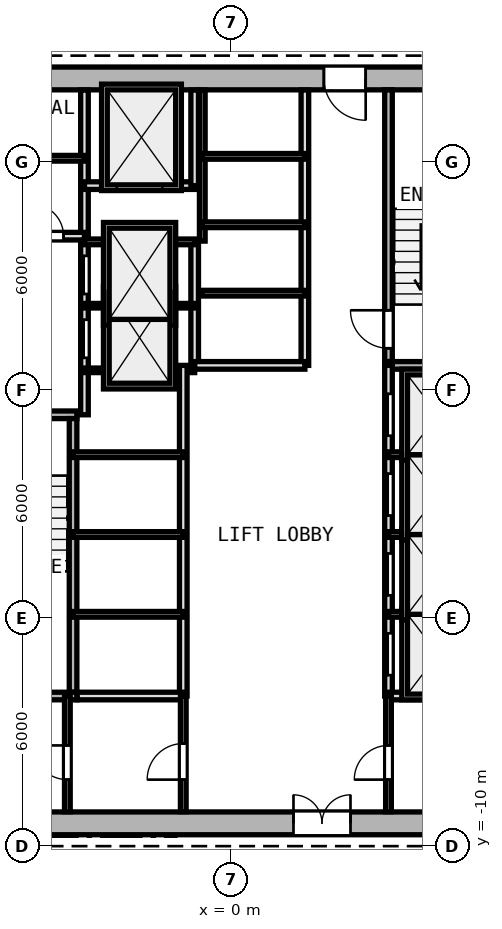
"""IFC4 building model, lengths in metres.
Left out: names, types, materials, properties, quantities, classifications, styles, units other than length and angle.
Written with IfcOpenShell. Run it as: python <this file> out.ifc"""

import sys

from ifc_helpers import new_model, si_unit, direction, frame, frame_2d, origin, origin_2d, place, context, subcontext, project, spatial, rectangle, i_section, extrude, element, fill, save


model = new_model("IFC4")
c1 = context("Model", 3, precision=1e-05, world=origin(), true_north=direction((0.0, 1.0)))
c2 = subcontext(c1, "Body", "Model", "MODEL_VIEW")
j1 = project(units=[si_unit("LENGTHUNIT", "METRE"), si_unit("PLANEANGLEUNIT", "RADIAN")], contexts=[c1])
p1 = place(None, origin())
s1 = spatial("IfcSite", under=j1, at=p1, CompositionType="ELEMENT")
p2 = place(p1, origin())
s2 = spatial("IfcBuilding", under=s1, at=p2, CompositionType="ELEMENT")
p3 = place(p2, frame((0.0, 0.0, 26.4)))
s3 = spatial("IfcBuildingStorey", under=s2, at=p3, CompositionType="ELEMENT", Elevation=26.4)
p4 = place(p3, frame((0.0, -9.4, 0.0), z_axis=(0.0, 0.0, 1.0), x_axis=(1.0, 0.0, 0.0)))
e1 = element("IfcColumn", 1, at=p4, inside=s3, PredefinedType="COLUMN", context=c2, shape_type="SweptSolid", body=[
    extrude(i_section(OverallWidth=0.416, OverallDepth=0.446, WebThickness=0.025, FlangeThickness=0.04, FilletRadius=0.015, at=origin_2d()), origin(), (0.0, 0.0, 1.0), 3.6),
])
p5 = place(p3, frame((-8.0, -9.4, 0.0), z_axis=(0.0, 0.0, 1.0), x_axis=(1.0, 0.0, 0.0)))
e2 = element("IfcWall", 2, at=p5, inside=s3, PredefinedType="SHEAR", context=c2, shape_type="SweptSolid", body=[
    extrude(rectangle(XDim=16.0, YDim=0.6, at=frame_2d((8.0, 0.0))), origin(), (0.0, 0.0, 1.0), 3.35),
])
p6 = place(p5, frame((9.65, 0.0, 0.0)))
e3 = element("IfcOpeningElement", 3, at=p6, cuts=e2, PredefinedType="OPENING", context=c2, shape_type="SweptSolid", body=[
    extrude(rectangle(XDim=1.5, YDim=2.2, at=frame_2d((0.75, 1.1))), frame((0.0, 0.31, 0.0), z_axis=(0.0, -1.0, 0.0), x_axis=(1.0, 0.0, 0.0)), (0.0, 0.0, 1.0), 0.62),
])
p7 = place(p3, frame((8.0, 10.2, 0.0), z_axis=(0.0, 0.0, 1.0), x_axis=(-1.0, 0.0, 0.0)))
e4 = element("IfcWall", 4, at=p7, inside=s3, PredefinedType="SHEAR", context=c2, shape_type="SweptSolid", body=[
    extrude(rectangle(XDim=16.0, YDim=0.6, at=frame_2d((8.0, 0.0))), origin(), (0.0, 0.0, 1.0), 3.35),
])
p8 = place(p7, frame((4.45, 0.0, 0.0)))
e5 = element("IfcOpeningElement", 5, at=p8, cuts=e4, PredefinedType="OPENING", context=c2, shape_type="SweptSolid", body=[
    extrude(rectangle(XDim=1.1, YDim=2.15, at=frame_2d((0.55, 1.075))), frame((0.0, 0.31, 0.0), z_axis=(0.0, -1.0, 0.0), x_axis=(1.0, 0.0, 0.0)), (0.0, 0.0, 1.0), 0.62),
])
p9 = place(p3, frame((-7.4, 1.35, 0.0), z_axis=(0.0, 0.0, 1.0), x_axis=(1.0, 0.0, 0.0)))
e6 = element("IfcWall", 6, at=p9, inside=s3, PredefinedType="SOLIDWALL", context=c2, shape_type="SweptSolid", body=[
    extrude(rectangle(XDim=3.35, YDim=0.2, at=frame_2d((1.675, 0.0))), origin(), (0.0, 0.0, 1.0), 3.35),
])
p10 = place(p9, frame((0.65, 0.0, 0.0)))
e7 = element("IfcOpeningElement", 7, at=p10, cuts=e6, PredefinedType="OPENING", context=c2, shape_type="SweptSolid", body=[
    extrude(rectangle(XDim=1.0, YDim=2.15, at=frame_2d((0.5, 1.075))), frame((0.0, 0.11, 0.0), z_axis=(0.0, -1.0, 0.0), x_axis=(1.0, 0.0, 0.0)), (0.0, 0.0, 1.0), 0.22),
])
p11 = place(p3, frame((-4.15, -5.95, 0.0), z_axis=(0.0, 0.0, 1.0), x_axis=(0.0, 1.0, 0.0)))
e8 = element("IfcWall", 8, at=p11, inside=s3, PredefinedType="SOLIDWALL", context=c2, shape_type="SweptSolid", body=[
    extrude(rectangle(XDim=7.2, YDim=0.2, at=frame_2d((3.6, 0.0))), origin(), (0.0, 0.0, 1.0), 3.35),
])
p12 = place(p3, frame((-3.85, 1.35, 0.0), z_axis=(0.0, 0.0, 1.0), x_axis=(0.0, 1.0, 0.0)))
e9 = element("IfcWall", 9, at=p12, inside=s3, PredefinedType="SOLIDWALL", context=c2, shape_type="SweptSolid", body=[
    extrude(rectangle(XDim=8.545, YDim=0.2, at=frame_2d((4.272, 0.0))), origin(), (0.0, 0.0, 1.0), 3.35),
])
p13 = place(p12, frame((1.5, 0.0, 0.0)))
e10 = element("IfcOpeningElement", 10, at=p13, cuts=e9, PredefinedType="OPENING", context=c2, shape_type="SweptSolid", body=[
    extrude(rectangle(XDim=1.0, YDim=2.15, at=frame_2d((0.5, 1.075))), frame((0.0, 0.11, 0.0), z_axis=(0.0, -1.0, 0.0), x_axis=(1.0, 0.0, 0.0)), (0.0, 0.0, 1.0), 0.22),
])
p14 = place(p12, frame((3.18, 0.0, 0.0)))
e11 = element("IfcOpeningElement", 11, at=p14, cuts=e9, PredefinedType="OPENING", context=c2, shape_type="SweptSolid", body=[
    extrude(rectangle(XDim=1.0, YDim=2.15, at=frame_2d((0.5, 1.075))), frame((0.0, 0.11, 0.0), z_axis=(0.0, -1.0, 0.0), x_axis=(1.0, 0.0, 0.0)), (0.0, 0.0, 1.0), 0.22),
])
p15 = place(p3, frame((-7.395, 6.05, 0.0), z_axis=(0.0, 0.0, 1.0), x_axis=(1.0, 0.0, 0.0)))
e12 = element("IfcWall", 12, at=p15, inside=s3, PredefinedType="SOLIDWALL", context=c2, shape_type="SweptSolid", body=[
    extrude(rectangle(XDim=3.545, YDim=0.2, at=frame_2d((1.772, 0.0))), origin(), (0.0, 0.0, 1.0), 3.35),
])
p16 = place(p15, frame((0.345, 0.0, 0.0)))
e13 = element("IfcOpeningElement", 13, at=p16, cuts=e12, PredefinedType="OPENING", context=c2, shape_type="SweptSolid", body=[
    extrude(rectangle(XDim=0.85, YDim=2.1, at=frame_2d((0.425, 1.05))), frame((0.0, 0.11, 0.0), z_axis=(0.0, -1.0, 0.0), x_axis=(1.0, 0.0, 0.0)), (0.0, 0.0, 1.0), 0.22),
])
p17 = place(p15, frame((2.145, 0.0, 0.0)))
e14 = element("IfcOpeningElement", 14, at=p17, cuts=e12, PredefinedType="OPENING", context=c2, shape_type="SweptSolid", body=[
    extrude(rectangle(XDim=0.85, YDim=2.1, at=frame_2d((0.425, 1.05))), frame((0.0, 0.11, 0.0), z_axis=(0.0, -1.0, 0.0), x_axis=(1.0, 0.0, 0.0)), (0.0, 0.0, 1.0), 0.22),
])
p18 = place(p3, frame((-7.395, 8.1, 0.0), z_axis=(0.0, 0.0, 1.0), x_axis=(1.0, 0.0, 0.0)))
e15 = element("IfcWall", 15, at=p18, inside=s3, PredefinedType="PARTITIONING", context=c2, shape_type="SweptSolid", body=[
    extrude(rectangle(XDim=3.545, YDim=0.15, at=frame_2d((1.772, 0.0))), origin(), (0.0, 0.0, 1.0), 3.35),
])
p19 = place(p3, frame((4.15, 2.75, 0.0), z_axis=(0.0, 0.0, 1.0), x_axis=(0.0, 1.0, 0.0)))
e16 = element("IfcWall", 16, at=p19, inside=s3, PredefinedType="SOLIDWALL", context=c2, shape_type="SweptSolid", body=[
    extrude(rectangle(XDim=7.15, YDim=0.2, at=frame_2d((3.575, 0.0))), origin(), (0.0, 0.0, 1.0), 3.35),
])
p20 = place(p19, frame((0.35, 0.0, 0.0)))
e17 = element("IfcOpeningElement", 17, at=p20, cuts=e16, PredefinedType="OPENING", context=c2, shape_type="SweptSolid", body=[
    extrude(rectangle(XDim=1.0, YDim=2.15, at=frame_2d((0.5, 1.075))), frame((0.0, 0.11, 0.0), z_axis=(0.0, -1.0, 0.0), x_axis=(1.0, 0.0, 0.0)), (0.0, 0.0, 1.0), 0.22),
])
p21 = place(p3, frame((4.05, 2.65, 0.0), z_axis=(0.0, 0.0, 1.0), x_axis=(1.0, 0.0, 0.0)))
e18 = element("IfcWall", 18, at=p21, inside=s3, PredefinedType="SOLIDWALL", context=c2, shape_type="SweptSolid", body=[
    extrude(rectangle(XDim=3.35, YDim=0.2, at=frame_2d((1.675, 0.0))), origin(), (0.0, 0.0, 1.0), 3.35),
])
p22 = place(p3, frame((-0.95, 2.65, 0.0), z_axis=(0.0, 0.0, 1.0), x_axis=(0.0, 1.0, 0.0)))
e19 = element("IfcWall", 19, at=p22, inside=s3, PredefinedType="SOLIDWALL", context=c2, shape_type="SweptSolid", body=[
    extrude(rectangle(XDim=3.27, YDim=0.2, at=frame_2d((1.635, 0.0))), origin(), (0.0, 0.0, 1.0), 3.35),
])
for number, where, z_axis, x_axis in (
    (20, (-3.85, 2.52, 0.0), (0.0, 0.0, 1.0), (1.0, 0.0, 0.0)),
    (21, (-3.85, 4.22, 0.0), (0.0, 0.0, 1.0), (1.0, 0.0, 0.0)),
):
    element("IfcWall", number, at=place(p3, frame(where, z_axis=z_axis, x_axis=x_axis)), inside=s3, PredefinedType="PARTITIONING", context=c2, shape_type="SweptSolid", body=[
        extrude(rectangle(XDim=2.9, YDim=0.12, at=frame_2d((1.45, 0.0))), origin(), (0.0, 0.0, 1.0), 3.35),
    ])
p23 = place(p3, frame((-3.85, 5.9, 0.0), z_axis=(0.0, 0.0, 1.0), x_axis=(1.0, 0.0, 0.0)))
e22 = element("IfcWall", 22, at=p23, inside=s3, PredefinedType="PARTITIONING", context=c2, shape_type="SweptSolid", body=[
    extrude(rectangle(XDim=2.9, YDim=0.15, at=frame_2d((1.45, 0.0))), origin(), (0.0, 0.0, 1.0), 3.35),
])
p24 = place(p3, frame((-3.85, 7.38, 0.0), z_axis=(0.0, 0.0, 1.0), x_axis=(1.0, 0.0, 0.0)))
e23 = element("IfcWall", 23, at=p24, inside=s3, PredefinedType="SOLIDWALL", context=c2, shape_type="SweptSolid", body=[
    extrude(rectangle(XDim=2.9, YDim=0.2, at=frame_2d((1.45, 0.0))), origin(), (0.0, 0.0, 1.0), 3.35),
])
p25 = place(p24, frame((0.85, 0.0, 0.0)))
e24 = element("IfcOpeningElement", 24, at=p25, cuts=e23, PredefinedType="OPENING", context=c2, shape_type="SweptSolid", body=[
    extrude(rectangle(XDim=1.2, YDim=2.2, at=frame_2d((0.6, 1.1))), frame((0.0, 0.11, 0.0), z_axis=(0.0, -1.0, 0.0), x_axis=(1.0, 0.0, 0.0)), (0.0, 0.0, 1.0), 0.22),
])
p26 = place(p3, frame((-0.95, 7.38, 0.0), z_axis=(0.0, 0.0, 1.0), x_axis=(0.0, 1.0, 0.0)))
e25 = element("IfcWall", 25, at=p26, inside=s3, PredefinedType="SOLIDWALL", context=c2, shape_type="SweptSolid", body=[
    extrude(rectangle(XDim=2.515, YDim=0.2, at=frame_2d((1.258, 0.0))), origin(), (0.0, 0.0, 1.0), 3.35),
])
p27 = place(p3, frame((4.15, -6.05, 0.0), z_axis=(0.0, 0.0, 1.0), x_axis=(0.0, 1.0, 0.0)))
e26 = element("IfcWall", 26, at=p27, inside=s3, PredefinedType="SOLIDWALL", context=c2, shape_type="SweptSolid", body=[
    extrude(rectangle(XDim=8.7, YDim=0.2, at=frame_2d((4.35, 0.0))), origin(), (0.0, 0.0, 1.0), 3.35),
])
p28 = place(p27, frame((0.55, 0.0, 0.0)))
e27 = element("IfcOpeningElement", 27, at=p28, cuts=e26, PredefinedType="OPENING", context=c2, shape_type="SweptSolid", body=[
    extrude(rectangle(XDim=1.1, YDim=2.15, at=frame_2d((0.55, 1.075))), frame((0.0, 0.11, 0.0), z_axis=(0.0, -1.0, 0.0), x_axis=(1.0, 0.0, 0.0)), (0.0, 0.0, 1.0), 0.22),
])
p29 = place(p27, frame((2.65, 0.0, 0.0)))
e28 = element("IfcOpeningElement", 28, at=p29, cuts=e26, PredefinedType="OPENING", context=c2, shape_type="SweptSolid", body=[
    extrude(rectangle(XDim=1.1, YDim=2.15, at=frame_2d((0.55, 1.075))), frame((0.0, 0.11, 0.0), z_axis=(0.0, -1.0, 0.0), x_axis=(1.0, 0.0, 0.0)), (0.0, 0.0, 1.0), 0.22),
])
p30 = place(p27, frame((4.75, 0.0, 0.0)))
e29 = element("IfcOpeningElement", 29, at=p30, cuts=e26, PredefinedType="OPENING", context=c2, shape_type="SweptSolid", body=[
    extrude(rectangle(XDim=1.1, YDim=2.15, at=frame_2d((0.55, 1.075))), frame((0.0, 0.11, 0.0), z_axis=(0.0, -1.0, 0.0), x_axis=(1.0, 0.0, 0.0)), (0.0, 0.0, 1.0), 0.22),
])
p31 = place(p27, frame((6.85, 0.0, 0.0)))
e30 = element("IfcOpeningElement", 30, at=p31, cuts=e26, PredefinedType="OPENING", context=c2, shape_type="SweptSolid", body=[
    extrude(rectangle(XDim=1.1, YDim=2.15, at=frame_2d((0.55, 1.075))), frame((0.0, 0.11, 0.0), z_axis=(0.0, -1.0, 0.0), x_axis=(1.0, 0.0, 0.0)), (0.0, 0.0, 1.0), 0.22),
])
for number, where, z_axis, x_axis in (
    (31, (4.15, -3.9, 0.0), (0.0, 0.0, 1.0), (1.0, 0.0, 0.0)),
    (32, (4.15, -1.8, 0.0), (0.0, 0.0, 1.0), (1.0, 0.0, 0.0)),
    (33, (4.15, 0.3, 0.0), (0.0, 0.0, 1.0), (1.0, 0.0, 0.0)),
):
    element("IfcWall", number, at=place(p3, frame(where, z_axis=z_axis, x_axis=x_axis)), inside=s3, PredefinedType="PARTITIONING", context=c2, shape_type="SweptSolid", body=[
        extrude(rectangle(XDim=2.6, YDim=0.15, at=frame_2d((1.3, 0.0))), origin(), (0.0, 0.0, 1.0), 3.35),
    ])
p32 = place(p3, frame((-1.25, -6.05, 0.0), z_axis=(0.0, 0.0, 1.0), x_axis=(0.0, 1.0, 0.0)))
e34 = element("IfcWall", 34, at=p32, inside=s3, PredefinedType="SOLIDWALL", context=c2, shape_type="SweptSolid", body=[
    extrude(rectangle(XDim=8.7, YDim=0.2, at=frame_2d((4.35, 0.0))), origin(), (0.0, 0.0, 1.0), 3.35),
])
for number, where, z_axis, x_axis in (
    (35, (-4.15, -3.9, 0.0), (0.0, 0.0, 1.0), (1.0, 0.0, 0.0)),
    (36, (-4.15, -1.8, 0.0), (0.0, 0.0, 1.0), (1.0, 0.0, 0.0)),
    (37, (-4.15, 0.3, 0.0), (0.0, 0.0, 1.0), (1.0, 0.0, 0.0)),
):
    element("IfcWall", number, at=place(p3, frame(where, z_axis=z_axis, x_axis=x_axis)), inside=s3, PredefinedType="PARTITIONING", context=c2, shape_type="SweptSolid", body=[
        extrude(rectangle(XDim=2.9, YDim=0.15, at=frame_2d((1.45, 0.0))), origin(), (0.0, 0.0, 1.0), 3.35),
    ])
p33 = place(p3, frame((1.95, 2.65, 0.0), z_axis=(0.0, 0.0, 1.0), x_axis=(0.0, 1.0, 0.0)))
e38 = element("IfcWall", 38, at=p33, inside=s3, PredefinedType="SOLIDWALL", context=c2, shape_type="SweptSolid", body=[
    extrude(rectangle(XDim=7.245, YDim=0.2, at=frame_2d((3.623, 0.0))), origin(), (0.0, 0.0, 1.0), 3.35),
])
p34 = place(p3, frame((-0.95, 2.65, 0.0), z_axis=(0.0, 0.0, 1.0), x_axis=(1.0, 0.0, 0.0)))
e39 = element("IfcWall", 39, at=p34, inside=s3, PredefinedType="SOLIDWALL", context=c2, shape_type="SweptSolid", body=[
    extrude(rectangle(XDim=2.9, YDim=0.2, at=frame_2d((1.45, 0.0))), origin(), (0.0, 0.0, 1.0), 3.35),
])
p35 = place(p3, frame((-0.75, 5.92, 0.0), z_axis=(0.0, 0.0, 1.0), x_axis=(0.0, 1.0, 0.0)))
e40 = element("IfcWall", 40, at=p35, inside=s3, PredefinedType="PARTITIONING", context=c2, shape_type="SweptSolid", body=[
    extrude(rectangle(XDim=3.975, YDim=0.15, at=frame_2d((1.988, 0.0))), origin(), (0.0, 0.0, 1.0), 3.35),
])
for number, where, z_axis, x_axis in (
    (41, (-0.75, 4.55, 0.0), (0.0, 0.0, 1.0), (1.0, 0.0, 0.0)),
    (42, (-0.75, 6.35, 0.0), (0.0, 0.0, 1.0), (1.0, 0.0, 0.0)),
    (43, (-0.75, 8.15, 0.0), (0.0, 0.0, 1.0), (1.0, 0.0, 0.0)),
):
    element("IfcWall", number, at=place(p3, frame(where, z_axis=z_axis, x_axis=x_axis)), inside=s3, PredefinedType="PARTITIONING", context=c2, shape_type="SweptSolid", body=[
        extrude(rectangle(XDim=2.7, YDim=0.15, at=frame_2d((1.35, 0.0))), origin(), (0.0, 0.0, 1.0), 3.35),
    ])
p36 = place(p3, frame((-7.4, -6.05, 0.0), z_axis=(0.0, 0.0, 1.0), x_axis=(1.0, 0.0, 0.0)))
e44 = element("IfcWall", 44, at=p36, inside=s3, PredefinedType="SOLIDWALL", context=c2, shape_type="SweptSolid", body=[
    extrude(rectangle(XDim=3.35, YDim=0.2, at=frame_2d((1.675, 0.0))), origin(), (0.0, 0.0, 1.0), 3.35),
])
p37 = place(p3, frame((-4.04, -6.05, 0.0), z_axis=(0.0, 0.0, 1.0), x_axis=(1.0, 0.0, 0.0)))
e45 = element("IfcWall", 45, at=p37, inside=s3, PredefinedType="SOLIDWALL", context=c2, shape_type="SweptSolid", body=[
    extrude(rectangle(XDim=2.79, YDim=0.2, at=frame_2d((1.395, 0.0))), origin(), (0.0, 0.0, 1.0), 3.35),
])
p38 = place(p3, frame((4.15, -6.05, 0.0), z_axis=(0.0, 0.0, 1.0), x_axis=(1.0, 0.0, 0.0)))
e46 = element("IfcWall", 46, at=p38, inside=s3, PredefinedType="SOLIDWALL", context=c2, shape_type="SweptSolid", body=[
    extrude(rectangle(XDim=3.245, YDim=0.2, at=frame_2d((1.623, 0.0))), origin(), (0.0, 0.0, 1.0), 3.35),
])
p39 = place(p3, frame((-1.25, -9.095, 0.0), z_axis=(0.0, 0.0, 1.0), x_axis=(0.0, 1.0, 0.0)))
e47 = element("IfcWall", 47, at=p39, inside=s3, PredefinedType="PARTITIONING", context=c2, shape_type="SweptSolid", body=[
    extrude(rectangle(XDim=3.045, YDim=0.15, at=frame_2d((1.522, 0.0))), origin(), (0.0, 0.0, 1.0), 3.35),
])
p40 = place(p39, frame((0.845, 0.0, 0.0)))
e48 = element("IfcOpeningElement", 48, at=p40, cuts=e47, PredefinedType="OPENING", context=c2, shape_type="SweptSolid", body=[
    extrude(rectangle(XDim=0.95, YDim=2.1, at=frame_2d((0.475, 1.05))), frame((0.0, 0.085, 0.0), z_axis=(0.0, -1.0, 0.0), x_axis=(1.0, 0.0, 0.0)), (0.0, 0.0, 1.0), 0.17),
])
p41 = place(p3, frame((4.15, -9.095, 0.0), z_axis=(0.0, 0.0, 1.0), x_axis=(0.0, 1.0, 0.0)))
e49 = element("IfcWall", 49, at=p41, inside=s3, PredefinedType="PARTITIONING", context=c2, shape_type="SweptSolid", body=[
    extrude(rectangle(XDim=3.045, YDim=0.15, at=frame_2d((1.522, 0.0))), origin(), (0.0, 0.0, 1.0), 3.35),
])
p42 = place(p41, frame((0.845, 0.0, 0.0)))
e50 = element("IfcOpeningElement", 50, at=p42, cuts=e49, PredefinedType="OPENING", context=c2, shape_type="SweptSolid", body=[
    extrude(rectangle(XDim=0.9, YDim=2.1, at=frame_2d((0.45, 1.05))), frame((0.0, 0.085, 0.0), z_axis=(0.0, -1.0, 0.0), x_axis=(1.0, 0.0, 0.0)), (0.0, 0.0, 1.0), 0.17),
])
p43 = place(p3, frame((-4.3, -9.095, 0.0), z_axis=(0.0, 0.0, 1.0), x_axis=(0.0, 1.0, 0.0)))
e51 = element("IfcWall", 51, at=p43, inside=s3, PredefinedType="PARTITIONING", context=c2, shape_type="SweptSolid", body=[
    extrude(rectangle(XDim=3.045, YDim=0.15, at=frame_2d((1.522, 0.0))), origin(), (0.0, 0.0, 1.0), 3.35),
])
p44 = place(p43, frame((0.845, 0.0, 0.0)))
e52 = element("IfcOpeningElement", 52, at=p44, cuts=e51, PredefinedType="OPENING", context=c2, shape_type="SweptSolid", body=[
    extrude(rectangle(XDim=0.9, YDim=2.1, at=frame_2d((0.45, 1.05))), frame((0.0, 0.085, 0.0), z_axis=(0.0, -1.0, 0.0), x_axis=(1.0, 0.0, 0.0)), (0.0, 0.0, 1.0), 0.17),
])
p45 = place(p6, origin())
e53 = element("IfcDoor", 53, at=p45, inside=s3, OperationType="DOUBLE_DOOR_SINGLE_SWING", PredefinedType="DOOR", context=c2, shape_type="SweptSolid", body=[
    extrude(rectangle(XDim=1.5, YDim=2.2, at=frame_2d((0.75, 1.1))), frame((0.0, 0.025, 0.0), z_axis=(0.0, -1.0, 0.0), x_axis=(1.0, 0.0, 0.0)), (0.0, 0.0, 1.0), 0.05),
])
fill(e3, e53)
p46 = place(p8, origin())
e54 = element("IfcDoor", 54, at=p46, inside=s3, OperationType="SINGLE_SWING_LEFT", PredefinedType="DOOR", context=c2, shape_type="SweptSolid", body=[
    extrude(rectangle(XDim=1.1, YDim=2.15, at=frame_2d((0.55, 1.075))), frame((0.0, 0.025, 0.0), z_axis=(0.0, -1.0, 0.0), x_axis=(1.0, 0.0, 0.0)), (0.0, 0.0, 1.0), 0.05),
])
fill(e5, e54)
p47 = place(p17, origin())
e55 = element("IfcDoor", 55, at=p47, inside=s3, OperationType="SINGLE_SWING_LEFT", PredefinedType="DOOR", context=c2, shape_type="SweptSolid", body=[
    extrude(rectangle(XDim=0.85, YDim=2.1, at=frame_2d((0.425, 1.05))), frame((0.0, 0.025, 0.0), z_axis=(0.0, -1.0, 0.0), x_axis=(1.0, 0.0, 0.0)), (0.0, 0.0, 1.0), 0.05),
])
fill(e14, e55)
p48 = place(p20, origin())
e56 = element("IfcDoor", 56, at=p48, inside=s3, OperationType="SINGLE_SWING_RIGHT", PredefinedType="DOOR", context=c2, shape_type="SweptSolid", body=[
    extrude(rectangle(XDim=1.0, YDim=2.15, at=frame_2d((0.5, 1.075))), frame((0.0, 0.025, 0.0), z_axis=(0.0, -1.0, 0.0), x_axis=(1.0, 0.0, 0.0)), (0.0, 0.0, 1.0), 0.05),
])
fill(e17, e56)
p49 = place(p25, origin())
e57 = element("IfcDoor", 57, at=p49, inside=s3, OperationType="DOUBLE_DOOR_SLIDING", PredefinedType="DOOR", context=c2, shape_type="SweptSolid", body=[
    extrude(rectangle(XDim=1.2, YDim=2.2, at=frame_2d((0.6, 1.1))), frame((0.0, 0.025, 0.0), z_axis=(0.0, -1.0, 0.0), x_axis=(1.0, 0.0, 0.0)), (0.0, 0.0, 1.0), 0.05),
])
fill(e24, e57)
p50 = place(p28, origin())
e58 = element("IfcDoor", 58, at=p50, inside=s3, OperationType="DOUBLE_DOOR_SLIDING", PredefinedType="DOOR", context=c2, shape_type="SweptSolid", body=[
    extrude(rectangle(XDim=1.1, YDim=2.15, at=frame_2d((0.55, 1.075))), frame((0.0, 0.025, 0.0), z_axis=(0.0, -1.0, 0.0), x_axis=(1.0, 0.0, 0.0)), (0.0, 0.0, 1.0), 0.05),
])
fill(e27, e58)
p51 = place(p29, origin())
e59 = element("IfcDoor", 59, at=p51, inside=s3, OperationType="DOUBLE_DOOR_SLIDING", PredefinedType="DOOR", context=c2, shape_type="SweptSolid", body=[
    extrude(rectangle(XDim=1.1, YDim=2.15, at=frame_2d((0.55, 1.075))), frame((0.0, 0.025, 0.0), z_axis=(0.0, -1.0, 0.0), x_axis=(1.0, 0.0, 0.0)), (0.0, 0.0, 1.0), 0.05),
])
fill(e28, e59)
p52 = place(p30, origin())
e60 = element("IfcDoor", 60, at=p52, inside=s3, OperationType="DOUBLE_DOOR_SLIDING", PredefinedType="DOOR", context=c2, shape_type="SweptSolid", body=[
    extrude(rectangle(XDim=1.1, YDim=2.15, at=frame_2d((0.55, 1.075))), frame((0.0, 0.025, 0.0), z_axis=(0.0, -1.0, 0.0), x_axis=(1.0, 0.0, 0.0)), (0.0, 0.0, 1.0), 0.05),
])
fill(e29, e60)
p53 = place(p31, origin())
e61 = element("IfcDoor", 61, at=p53, inside=s3, OperationType="DOUBLE_DOOR_SLIDING", PredefinedType="DOOR", context=c2, shape_type="SweptSolid", body=[
    extrude(rectangle(XDim=1.1, YDim=2.15, at=frame_2d((0.55, 1.075))), frame((0.0, 0.025, 0.0), z_axis=(0.0, -1.0, 0.0), x_axis=(1.0, 0.0, 0.0)), (0.0, 0.0, 1.0), 0.05),
])
fill(e30, e61)
p54 = place(p13, origin())
e62 = element("IfcDoor", 62, at=p54, inside=s3, OperationType="DOUBLE_DOOR_SLIDING", PredefinedType="DOOR", context=c2, shape_type="SweptSolid", body=[
    extrude(rectangle(XDim=1.0, YDim=2.15, at=frame_2d((0.5, 1.075))), frame((0.0, 0.025, 0.0), z_axis=(0.0, -1.0, 0.0), x_axis=(1.0, 0.0, 0.0)), (0.0, 0.0, 1.0), 0.05),
])
fill(e10, e62)
p55 = place(p14, origin())
e63 = element("IfcDoor", 63, at=p55, inside=s3, OperationType="DOUBLE_DOOR_SLIDING", PredefinedType="DOOR", context=c2, shape_type="SweptSolid", body=[
    extrude(rectangle(XDim=1.0, YDim=2.15, at=frame_2d((0.5, 1.075))), frame((0.0, 0.025, 0.0), z_axis=(0.0, -1.0, 0.0), x_axis=(1.0, 0.0, 0.0)), (0.0, 0.0, 1.0), 0.05),
])
fill(e11, e63)
p56 = place(p40, origin())
e64 = element("IfcDoor", 64, at=p56, inside=s3, OperationType="SINGLE_SWING_LEFT", PredefinedType="DOOR", context=c2, shape_type="SweptSolid", body=[
    extrude(rectangle(XDim=0.95, YDim=2.1, at=frame_2d((0.475, 1.05))), frame((0.0, 0.025, 0.0), z_axis=(0.0, -1.0, 0.0), x_axis=(1.0, 0.0, 0.0)), (0.0, 0.0, 1.0), 0.05),
])
fill(e48, e64)
p57 = place(p44, origin())
e65 = element("IfcDoor", 65, at=p57, inside=s3, OperationType="SINGLE_SWING_RIGHT", PredefinedType="DOOR", context=c2, shape_type="SweptSolid", body=[
    extrude(rectangle(XDim=0.9, YDim=2.1, at=frame_2d((0.45, 1.05))), frame((0.0, 0.025, 0.0), z_axis=(0.0, -1.0, 0.0), x_axis=(1.0, 0.0, 0.0)), (0.0, 0.0, 1.0), 0.05),
])
fill(e52, e65)
p58 = place(p42, origin())
e66 = element("IfcDoor", 66, at=p58, inside=s3, OperationType="SINGLE_SWING_LEFT", PredefinedType="DOOR", context=c2, shape_type="SweptSolid", body=[
    extrude(rectangle(XDim=0.9, YDim=2.1, at=frame_2d((0.45, 1.05))), frame((0.0, 0.025, 0.0), z_axis=(0.0, -1.0, 0.0), x_axis=(1.0, 0.0, 0.0)), (0.0, 0.0, 1.0), 0.05),
])
fill(e50, e66)
save(model, sys.argv[1])
